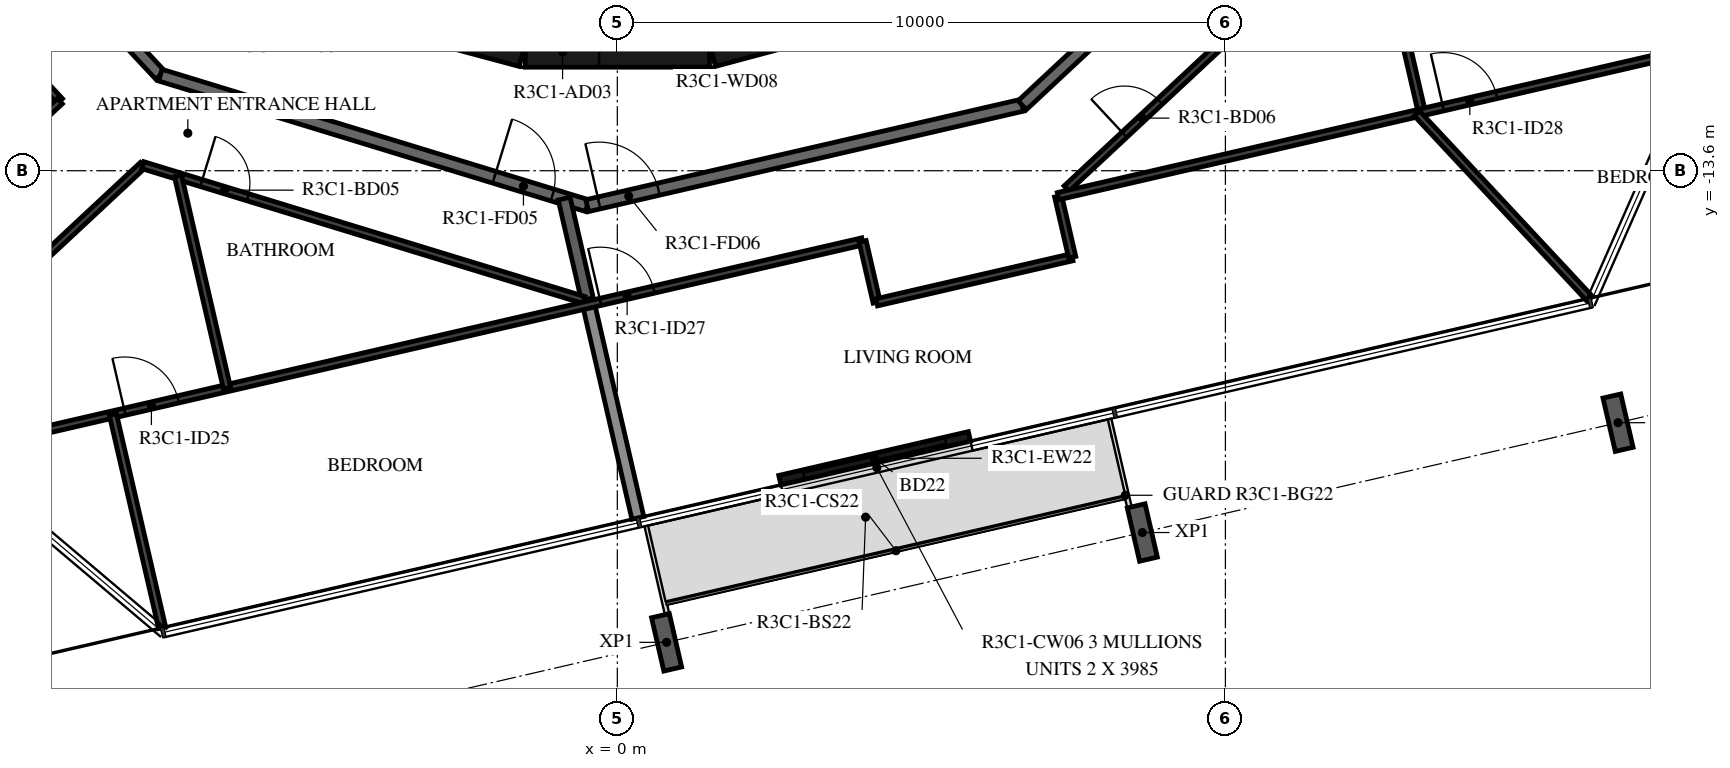
"""IFC4 building model, lengths in metres.
Left out: names, types, materials, properties, quantities, classifications, styles, units other than length and angle.
Written with IfcOpenShell. Run it as: python <this file> out.ifc"""

import sys

from ifc_helpers import new_model, si_unit, direction, frame, frame_2d, origin, origin_2d, place, context, subcontext, project, spatial, rectangle, i_section, extrude, element, fill, save


model = new_model("IFC4")
c1 = context("Model", 3, precision=1e-05, world=origin(), true_north=direction((0.0, 1.0)))
c2 = subcontext(c1, "Body", "Model", "MODEL_VIEW")
j1 = project(units=[si_unit("LENGTHUNIT", "METRE"), si_unit("PLANEANGLEUNIT", "RADIAN")], contexts=[c1])
p1 = place(None, origin())
s1 = spatial("IfcSite", under=j1, at=p1, CompositionType="ELEMENT")
p2 = place(p1, origin())
s2 = spatial("IfcBuilding", under=s1, at=p2, CompositionType="ELEMENT")
p3 = place(p2, frame((0.0, 0.0, 137.9)))
s3 = spatial("IfcBuildingStorey", under=s2, at=p3, CompositionType="ELEMENT", Elevation=137.9)
for number, where, z_axis, x_axis in (
    (1, (8.634, -19.55, -0.38), (0.0, 0.0, 1.0), (-0.974, -0.225, 0.0)),
    (2, (16.457, -17.744, -0.38), (0.0, 0.0, 1.0), (-0.974, -0.225, 0.0)),
    (3, (0.81, -21.356, -0.38), (0.0, 0.0, 1.0), (-0.974, -0.225, 0.0)),
):
    element("IfcColumn", number, at=place(p3, frame(where, z_axis=z_axis, x_axis=x_axis)), inside=s3, PredefinedType="COLUMN", context=c2, shape_type="SweptSolid", body=[
        extrude(i_section(OverallWidth=0.3, OverallDepth=0.9, WebThickness=0.019, FlangeThickness=0.035, FilletRadius=0.03, at=origin_2d()), origin(), (0.0, 0.0, 1.0), 3.5),
    ])
p4 = place(p3, frame((2.673, -18.689, 0.0), z_axis=(0.0, 0.0, 1.0), x_axis=(0.974360325718, 0.224993234715, 0.0)))
e4 = element("IfcWall", 4, at=p4, inside=s3, PredefinedType="STANDARD", context=c2, shape_type="SweptSolid", body=[
    extrude(rectangle(XDim=3.2, YDim=0.16, at=frame_2d((1.6, 0.0))), origin(), (0.0, 0.0, 1.0), 3.12),
])
p5 = place(p4, frame((0.4, 0.0, 0.0)))
e5 = element("IfcOpeningElement", 5, at=p5, cuts=e4, PredefinedType="OPENING", context=c2, shape_type="SweptSolid", body=[
    extrude(rectangle(XDim=2.4, YDim=2.4, at=frame_2d((1.2, 1.2))), frame((0.0, 0.09, 0.0), z_axis=(0.0, -1.0, 0.0), x_axis=(1.0, 0.0, 0.0)), (0.0, 0.0, 1.0), 0.18),
])
p6 = place(p3, frame((1.55, -11.643, 0.0), z_axis=(0.0, 0.0, 1.0), x_axis=(0.965948410781, 0.258734743916, 0.0)))
e6 = element("IfcWall", 6, at=p6, inside=s3, PredefinedType="SHEAR", context=c2, shape_type="SweptSolid", body=[
    extrude(rectangle(XDim=3.033, YDim=0.5, at=frame_2d((1.516, 0.0))), origin(), (0.0, 0.0, 1.0), 3.12),
])
p7 = place(p6, frame((1.066, 0.0, 0.0)))
e7 = element("IfcOpeningElement", 7, at=p7, cuts=e6, PredefinedType="OPENING", context=c2, shape_type="SweptSolid", body=[
    extrude(rectangle(XDim=0.9, YDim=2.1, at=frame_2d((0.45, 1.05))), frame((0.0, 0.26, 0.0), z_axis=(0.0, -1.0, 0.0), x_axis=(1.0, 0.0, 0.0)), (0.0, 0.0, 1.0), 0.52),
])
p8 = place(p3, frame((-4.479, -10.858, 0.0), z_axis=(0.0, 0.0, 1.0), x_axis=(0.965948410781, -0.258734743916, 0.0)))
e8 = element("IfcWall", 8, at=p8, inside=s3, PredefinedType="SHEAR", context=c2, shape_type="SweptSolid", body=[
    extrude(rectangle(XDim=3.033, YDim=0.5, at=frame_2d((1.516, 0.0))), origin(), (0.0, 0.0, 1.0), 3.12),
])
p9 = place(p3, frame((-1.516, -11.647, 0.0), z_axis=(0.0, 0.0, 1.0), x_axis=(1.0, 0.0, 0.0)))
e9 = element("IfcWall", 9, at=p9, inside=s3, PredefinedType="SHEAR", context=c2, shape_type="SweptSolid", body=[
    extrude(rectangle(XDim=3.033, YDim=0.5, at=frame_2d((1.516, 0.0))), origin(), (0.0, 0.0, 1.0), 3.12),
])
p10 = place(p9, frame((0.016, 0.0, 0.0)))
e10 = element("IfcOpeningElement", 10, at=p10, cuts=e9, PredefinedType="OPENING", context=c2, shape_type="SweptSolid", body=[
    extrude(rectangle(XDim=1.2, YDim=2.1, at=frame_2d((0.6, 1.05))), frame((0.0, 0.26, 0.0), z_axis=(0.0, -1.0, 0.0), x_axis=(1.0, 0.0, 0.0)), (0.0, 0.0, 1.0), 0.52),
])
p11 = place(p3, frame((-12.523, -6.659, 0.0), z_axis=(0.0, 0.0, 1.0), x_axis=(0.682001841105, -0.731350455479, 0.0)))
e11 = element("IfcWall", 11, at=p11, inside=s3, PredefinedType="STANDARD", context=c2, shape_type="SweptSolid", body=[
    extrude(rectangle(XDim=7.342, YDim=0.2, at=frame_2d((3.671, 0.0))), origin(), (0.0, 0.0, 1.0), 3.12),
])
p12 = place(p3, frame((-7.516, -12.028, 0.0), z_axis=(0.0, 0.0, 1.0), x_axis=(0.956306642771, -0.292365533182, 0.0)))
e12 = element("IfcWall", 12, at=p12, inside=s3, PredefinedType="STANDARD", context=c2, shape_type="SweptSolid", body=[
    extrude(rectangle(XDim=7.342, YDim=0.2, at=frame_2d((3.671, 0.0))), origin(), (0.0, 0.0, 1.0), 3.12),
])
p13 = place(p12, frame((5.745, 0.0, 0.0)))
e13 = element("IfcOpeningElement", 13, at=p13, cuts=e12, PredefinedType="OPENING", context=c2, shape_type="SweptSolid", body=[
    extrude(rectangle(XDim=1.0, YDim=2.1, at=frame_2d((0.5, 1.05))), frame((0.0, 0.11, 0.0), z_axis=(0.0, -1.0, 0.0), x_axis=(1.0, 0.0, 0.0)), (0.0, 0.0, 1.0), 0.22),
])
p14 = place(p3, frame((-0.495, -14.175, 0.0), z_axis=(0.0, 0.0, 1.0), x_axis=(0.974376622151, 0.224922649383, 0.0)))
e14 = element("IfcWall", 14, at=p14, inside=s3, PredefinedType="STANDARD", context=c2, shape_type="SweptSolid", body=[
    extrude(rectangle(XDim=7.342, YDim=0.2, at=frame_2d((3.671, 0.0))), origin(), (0.0, 0.0, 1.0), 3.12),
])
p15 = place(p14, frame((0.2, 0.0, 0.0)))
e15 = element("IfcOpeningElement", 15, at=p15, cuts=e14, PredefinedType="OPENING", context=c2, shape_type="SweptSolid", body=[
    extrude(rectangle(XDim=1.0, YDim=2.1, at=frame_2d((0.5, 1.05))), frame((0.0, 0.11, 0.0), z_axis=(0.0, -1.0, 0.0), x_axis=(1.0, 0.0, 0.0)), (0.0, 0.0, 1.0), 0.22),
])
p16 = place(p3, frame((6.659, -12.523, 0.0), z_axis=(0.0, 0.0, 1.0), x_axis=(0.731350455479, 0.682001841105, 0.0)))
e16 = element("IfcWall", 16, at=p16, inside=s3, PredefinedType="STANDARD", context=c2, shape_type="SweptSolid", body=[
    extrude(rectangle(XDim=7.342, YDim=0.2, at=frame_2d((3.671, 0.0))), origin(), (0.0, 0.0, 1.0), 3.12),
])
p17 = place(p3, frame((-0.492, -15.713, 0.0), z_axis=(0.0, 0.0, 1.0), x_axis=(-0.224974992875, 0.97436453783, 0.0)))
e17 = element("IfcWall", 17, at=p17, inside=s3, PredefinedType="STANDARD", context=c2, shape_type="SweptSolid", body=[
    extrude(rectangle(XDim=1.698, YDim=0.2, at=frame_2d((0.849, 0.0))), origin(), (0.0, 0.0, 1.0), 3.12),
])
p18 = place(p3, frame((0.338, -19.31, 0.0), z_axis=(0.0, 0.0, 1.0), x_axis=(-0.224943703639, 0.9743717618, 0.0)))
e18 = element("IfcWall", 18, at=p18, inside=s3, PredefinedType="STANDARD", context=c2, shape_type="SweptSolid", body=[
    extrude(rectangle(XDim=3.6, YDim=0.2, at=frame_2d((1.8, 0.0))), origin(), (0.0, 0.0, 1.0), 2.73),
])
p19 = place(p3, frame((-11.117, -10.366, 0.0), z_axis=(0.0, 0.0, 1.0), x_axis=(0.682029016154, -0.73132511315, 0.0)))
e19 = element("IfcWall", 19, at=p19, inside=s3, PredefinedType="PARTITIONING", context=c2, shape_type="SweptSolid", body=[
    extrude(rectangle(XDim=2.858, YDim=0.12, at=frame_2d((1.429, 0.0))), origin(), (0.0, 0.0, 1.0), 3.12),
])
p20 = place(p19, frame((0.2, 0.0, 0.0)))
e20 = element("IfcOpeningElement", 20, at=p20, cuts=e19, PredefinedType="OPENING", context=c2, shape_type="SweptSolid", body=[
    extrude(rectangle(XDim=0.9, YDim=2.1, at=frame_2d((0.45, 1.05))), frame((0.0, 0.07, 0.0), z_axis=(0.0, -1.0, 0.0), x_axis=(1.0, 0.0, 0.0)), (0.0, 0.0, 1.0), 0.14),
])
p21 = place(p3, frame((-9.168, -12.456, 0.0), z_axis=(0.0, 0.0, 1.0), x_axis=(-0.731372816465, -0.681977861324, 0.0)))
e21 = element("IfcWall", 21, at=p21, inside=s3, PredefinedType="PARTITIONING", context=c2, shape_type="SweptSolid", body=[
    extrude(rectangle(XDim=3.578, YDim=0.12, at=frame_2d((1.789, 0.0))), origin(), (0.0, 0.0, 1.0), 3.12),
])
p22 = place(p3, frame((-10.625, -16.14, 0.0), z_axis=(0.0, 0.0, 1.0), x_axis=(0.73135399721, 0.68199804308, 0.0)))
e22 = element("IfcWall", 22, at=p22, inside=s3, PredefinedType="PARTITIONING", context=c2, shape_type="SweptSolid", body=[
    extrude(rectangle(XDim=3.858, YDim=0.12, at=frame_2d((1.929, 0.0))), origin(), (0.0, 0.0, 1.0), 3.12),
])
p23 = place(p3, frame((-7.804, -13.509, 0.0), z_axis=(0.0, 0.0, 1.0), x_axis=(0.956309088343, -0.292357533772, 0.0)))
e23 = element("IfcWall", 23, at=p23, inside=s3, PredefinedType="PARTITIONING", context=c2, shape_type="SweptSolid", body=[
    extrude(rectangle(XDim=7.586, YDim=0.12, at=frame_2d((3.793, 0.0))), origin(), (0.0, 0.0, 1.0), 3.12),
])
p24 = place(p23, frame((1.006, 0.0, 0.0)))
e24 = element("IfcOpeningElement", 24, at=p24, cuts=e23, PredefinedType="OPENING", context=c2, shape_type="SweptSolid", body=[
    extrude(rectangle(XDim=0.8, YDim=2.1, at=frame_2d((0.4, 1.05))), frame((0.0, 0.07, 0.0), z_axis=(0.0, -1.0, 0.0), x_axis=(1.0, 0.0, 0.0)), (0.0, 0.0, 1.0), 0.14),
])
p25 = place(p3, frame((-14.736, -19.095, 0.0), z_axis=(0.0, 0.0, 1.0), x_axis=(0.974368335243, 0.224958545682, 0.0)))
e25 = element("IfcWall", 25, at=p25, inside=s3, PredefinedType="PARTITIONING", context=c2, shape_type="SweptSolid", body=[
    extrude(rectangle(XDim=19.263, YDim=0.12, at=frame_2d((9.632, 0.0))), origin(), (0.0, 0.0, 1.0), 3.12),
])
p26 = place(p25, frame((2.993, 0.0, 0.0)))
e26 = element("IfcOpeningElement", 26, at=p26, cuts=e25, PredefinedType="OPENING", context=c2, shape_type="SweptSolid", body=[
    extrude(rectangle(XDim=0.9, YDim=2.1, at=frame_2d((0.45, 1.05))), frame((0.0, 0.07, 0.0), z_axis=(0.0, -1.0, 0.0), x_axis=(1.0, 0.0, 0.0)), (0.0, 0.0, 1.0), 0.14),
])
p27 = place(p25, frame((6.81, 0.0, 0.0)))
e27 = element("IfcOpeningElement", 27, at=p27, cuts=e25, PredefinedType="OPENING", context=c2, shape_type="SweptSolid", body=[
    extrude(rectangle(XDim=0.9, YDim=2.1, at=frame_2d((0.45, 1.05))), frame((0.0, 0.07, 0.0), z_axis=(0.0, -1.0, 0.0), x_axis=(1.0, 0.0, 0.0)), (0.0, 0.0, 1.0), 0.14),
])
p28 = place(p25, frame((0.2, 0.0, 0.0)))
e28 = element("IfcOpeningElement", 28, at=p28, cuts=e25, PredefinedType="OPENING", context=c2, shape_type="SweptSolid", body=[
    extrude(rectangle(XDim=0.9, YDim=2.1, at=frame_2d((0.45, 1.05))), frame((0.0, 0.07, 0.0), z_axis=(0.0, -1.0, 0.0), x_axis=(1.0, 0.0, 0.0)), (0.0, 0.0, 1.0), 0.14),
])
p29 = place(p25, frame((14.839, 0.0, 0.0)))
e29 = element("IfcOpeningElement", 29, at=p29, cuts=e25, PredefinedType="OPENING", context=c2, shape_type="SweptSolid", body=[
    extrude(rectangle(XDim=0.9, YDim=2.1, at=frame_2d((0.45, 1.05))), frame((0.0, 0.07, 0.0), z_axis=(0.0, -1.0, 0.0), x_axis=(1.0, 0.0, 0.0)), (0.0, 0.0, 1.0), 0.14),
])
p30 = place(p3, frame((-6.419, -17.175, 0.0), z_axis=(0.0, 0.0, 1.0), x_axis=(-0.224979003559, 0.974363611778, 0.0)))
e30 = element("IfcWall", 30, at=p30, inside=s3, PredefinedType="PARTITIONING", context=c2, shape_type="SweptSolid", body=[
    extrude(rectangle(XDim=3.581, YDim=0.12, at=frame_2d((1.791, 0.0))), origin(), (0.0, 0.0, 1.0), 3.12),
])
p31 = place(p3, frame((-7.486, -21.116, 0.0), z_axis=(0.0, 0.0, 1.0), x_axis=(-0.224943703639, 0.9743717618, 0.0)))
e31 = element("IfcWall", 31, at=p31, inside=s3, PredefinedType="PARTITIONING", context=c2, shape_type="SweptSolid", body=[
    extrude(rectangle(XDim=3.6, YDim=0.12, at=frame_2d((1.8, 0.0))), origin(), (0.0, 0.0, 1.0), 2.73),
])
p32 = place(p3, frame((4.034, -14.762, 0.0), z_axis=(0.0, 0.0, 1.0), x_axis=(0.224859506699, -0.974391195695, 0.0)))
e32 = element("IfcWall", 32, at=p32, inside=s3, PredefinedType="PARTITIONING", context=c2, shape_type="SweptSolid", body=[
    extrude(rectangle(XDim=1.029, YDim=0.12, at=frame_2d((0.515, 0.0))), origin(), (0.0, 0.0, 1.0), 3.12),
])
p33 = place(p3, frame((4.265, -15.765, 0.0), z_axis=(0.0, 0.0, 1.0), x_axis=(0.974382467056, 0.22489732745, 0.0)))
e33 = element("IfcWall", 33, at=p33, inside=s3, PredefinedType="PARTITIONING", context=c2, shape_type="SweptSolid", body=[
    extrude(rectangle(XDim=3.3, YDim=0.12, at=frame_2d((1.65, 0.0))), origin(), (0.0, 0.0, 1.0), 3.12),
])
p34 = place(p3, frame((7.481, -15.022, 0.0), z_axis=(0.0, 0.0, 1.0), x_axis=(-0.225084689316, 0.974339203068, 0.0)))
e34 = element("IfcWall", 34, at=p34, inside=s3, PredefinedType="PARTITIONING", context=c2, shape_type="SweptSolid", body=[
    extrude(rectangle(XDim=1.029, YDim=0.12, at=frame_2d((0.515, 0.0))), origin(), (0.0, 0.0, 1.0), 3.12),
])
p35 = place(p3, frame((7.388, -13.894, 0.0), z_axis=(0.0, 0.0, 1.0), x_axis=(0.731339966659, 0.682013088707, 0.0)))
e35 = element("IfcWall", 35, at=p35, inside=s3, PredefinedType="PARTITIONING", context=c2, shape_type="SweptSolid", body=[
    extrude(rectangle(XDim=6.899, YDim=0.12, at=frame_2d((3.45, 0.0))), origin(), (0.0, 0.0, 1.0), 3.12),
])
p36 = place(p35, frame((1.3, 0.0, 0.0)))
e36 = element("IfcOpeningElement", 36, at=p36, cuts=e35, PredefinedType="OPENING", context=c2, shape_type="SweptSolid", body=[
    extrude(rectangle(XDim=0.8, YDim=2.1, at=frame_2d((0.4, 1.05))), frame((0.0, 0.07, 0.0), z_axis=(0.0, -1.0, 0.0), x_axis=(1.0, 0.0, 0.0)), (0.0, 0.0, 1.0), 0.14),
])
p37 = place(p3, frame((12.434, -9.189, 0.0), z_axis=(0.0, 0.0, 1.0), x_axis=(0.224924972887, -0.974376085796, 0.0)))
e37 = element("IfcWall", 37, at=p37, inside=s3, PredefinedType="PARTITIONING", context=c2, shape_type="SweptSolid", body=[
    extrude(rectangle(XDim=3.541, YDim=0.12, at=frame_2d((1.771, 0.0))), origin(), (0.0, 0.0, 1.0), 3.12),
])
p38 = place(p3, frame((7.249, -14.02, 0.0), z_axis=(0.0, 0.0, 1.0), x_axis=(0.974369514697, 0.224953437023, 0.0)))
e38 = element("IfcWall", 38, at=p38, inside=s3, PredefinedType="PARTITIONING", context=c2, shape_type="SweptSolid", body=[
    extrude(rectangle(XDim=12.149, YDim=0.12, at=frame_2d((6.074, 0.0))), origin(), (0.0, 0.0, 1.0), 3.12),
])
p39 = place(p38, frame((6.498, 0.0, 0.0)))
e39 = element("IfcOpeningElement", 39, at=p39, cuts=e38, PredefinedType="OPENING", context=c2, shape_type="SweptSolid", body=[
    extrude(rectangle(XDim=0.9, YDim=2.1, at=frame_2d((0.45, 1.05))), frame((0.0, 0.07, 0.0), z_axis=(0.0, -1.0, 0.0), x_axis=(1.0, 0.0, 0.0)), (0.0, 0.0, 1.0), 0.14),
])
p40 = place(p3, frame((15.985, -15.698, 0.0), z_axis=(0.0, 0.0, 1.0), x_axis=(-0.681979185924, 0.731371581322, 0.0)))
e40 = element("IfcWall", 40, at=p40, inside=s3, PredefinedType="PARTITIONING", context=c2, shape_type="SweptSolid", body=[
    extrude(rectangle(XDim=4.157, YDim=0.12, at=frame_2d((2.079, 0.0))), origin(), (0.0, 0.0, 1.0), 3.12),
])
p41 = place(p5, origin())
e41 = element("IfcDoor", 41, at=p41, inside=s3, OperationType="DOUBLE_DOOR_SLIDING", PredefinedType="DOOR", context=c2, shape_type="SweptSolid", body=[
    extrude(rectangle(XDim=2.4, YDim=2.4, at=frame_2d((1.2, 1.2))), frame((0.0, 0.025, 0.0), z_axis=(0.0, -1.0, 0.0), x_axis=(1.0, 0.0, 0.0)), (0.0, 0.0, 1.0), 0.05),
])
fill(e5, e41)
p42 = place(p10, origin())
e42 = element("IfcDoor", 42, at=p42, inside=s3, OperationType="SINGLE_SWING_RIGHT", PredefinedType="DOOR", context=c2, shape_type="SweptSolid", body=[
    extrude(rectangle(XDim=1.2, YDim=2.1, at=frame_2d((0.6, 1.05))), frame((0.0, 0.025, 0.0), z_axis=(0.0, -1.0, 0.0), x_axis=(1.0, 0.0, 0.0)), (0.0, 0.0, 1.0), 0.05),
])
fill(e10, e42)
p43 = place(p13, origin())
e43 = element("IfcDoor", 43, at=p43, inside=s3, OperationType="SINGLE_SWING_LEFT", PredefinedType="DOOR", context=c2, shape_type="SweptSolid", body=[
    extrude(rectangle(XDim=1.0, YDim=2.1, at=frame_2d((0.5, 1.05))), frame((0.0, 0.025, 0.0), z_axis=(0.0, -1.0, 0.0), x_axis=(1.0, 0.0, 0.0)), (0.0, 0.0, 1.0), 0.05),
])
fill(e13, e43)
p44 = place(p24, origin())
e44 = element("IfcDoor", 44, at=p44, inside=s3, OperationType="SINGLE_SWING_LEFT", PredefinedType="DOOR", context=c2, shape_type="SweptSolid", body=[
    extrude(rectangle(XDim=0.8, YDim=2.1, at=frame_2d((0.4, 1.05))), frame((0.0, 0.025, 0.0), z_axis=(0.0, -1.0, 0.0), x_axis=(1.0, 0.0, 0.0)), (0.0, 0.0, 1.0), 0.05),
])
fill(e24, e44)
p45 = place(p27, origin())
e45 = element("IfcDoor", 45, at=p45, inside=s3, OperationType="SINGLE_SWING_LEFT", PredefinedType="DOOR", context=c2, shape_type="SweptSolid", body=[
    extrude(rectangle(XDim=0.9, YDim=2.1, at=frame_2d((0.45, 1.05))), frame((0.0, 0.025, 0.0), z_axis=(0.0, -1.0, 0.0), x_axis=(1.0, 0.0, 0.0)), (0.0, 0.0, 1.0), 0.05),
])
fill(e27, e45)
p46 = place(p15, origin())
e46 = element("IfcDoor", 46, at=p46, inside=s3, OperationType="SINGLE_SWING_LEFT", PredefinedType="DOOR", context=c2, shape_type="SweptSolid", body=[
    extrude(rectangle(XDim=1.0, YDim=2.1, at=frame_2d((0.5, 1.05))), frame((0.0, 0.025, 0.0), z_axis=(0.0, -1.0, 0.0), x_axis=(1.0, 0.0, 0.0)), (0.0, 0.0, 1.0), 0.05),
])
fill(e15, e46)
p47 = place(p29, origin())
e47 = element("IfcDoor", 47, at=p47, inside=s3, OperationType="SINGLE_SWING_LEFT", PredefinedType="DOOR", context=c2, shape_type="SweptSolid", body=[
    extrude(rectangle(XDim=0.9, YDim=2.1, at=frame_2d((0.45, 1.05))), frame((0.0, 0.025, 0.0), z_axis=(0.0, -1.0, 0.0), x_axis=(1.0, 0.0, 0.0)), (0.0, 0.0, 1.0), 0.05),
])
fill(e29, e47)
p48 = place(p36, origin())
e48 = element("IfcDoor", 48, at=p48, inside=s3, OperationType="SINGLE_SWING_RIGHT", PredefinedType="DOOR", context=c2, shape_type="SweptSolid", body=[
    extrude(rectangle(XDim=0.8, YDim=2.1, at=frame_2d((0.4, 1.05))), frame((0.0, 0.025, 0.0), z_axis=(0.0, -1.0, 0.0), x_axis=(1.0, 0.0, 0.0)), (0.0, 0.0, 1.0), 0.05),
])
fill(e36, e48)
p49 = place(p39, origin())
e49 = element("IfcDoor", 49, at=p49, inside=s3, OperationType="SINGLE_SWING_RIGHT", PredefinedType="DOOR", context=c2, shape_type="SweptSolid", body=[
    extrude(rectangle(XDim=0.9, YDim=2.1, at=frame_2d((0.45, 1.05))), frame((0.0, 0.025, 0.0), z_axis=(0.0, -1.0, 0.0), x_axis=(1.0, 0.0, 0.0)), (0.0, 0.0, 1.0), 0.05),
])
fill(e39, e49)
save(model, sys.argv[1])
